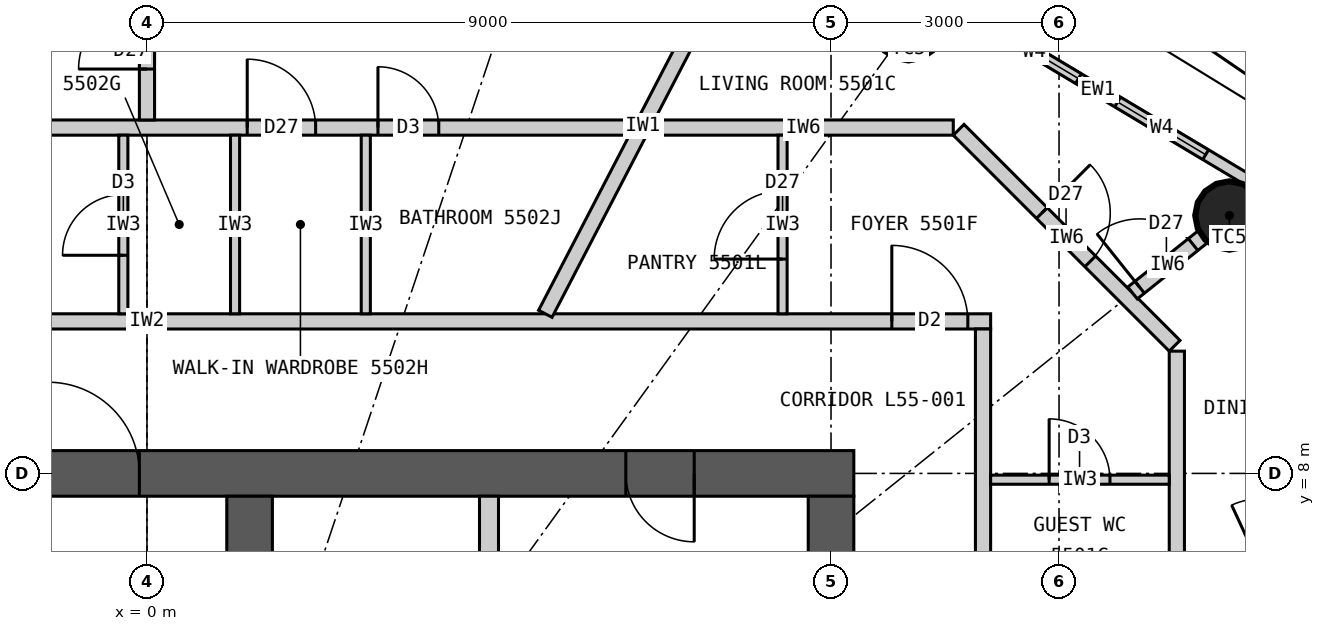
"""IFC4 building model, lengths in metres.
Left out: names, types, materials, properties, quantities, classifications, styles, units other than length and angle.
Written with IfcOpenShell. Run it as: python <this file> out.ifc"""

import sys

from ifc_helpers import new_model, si_unit, direction, frame, frame_2d, origin, origin_2d, place, context, subcontext, project, spatial, rectangle, circle, extrude, element, fill, save


model = new_model("IFC4")
c1 = context("Model", 3, precision=1e-05, world=origin(), true_north=direction((0.0, 1.0)))
c2 = subcontext(c1, "Body", "Model", "MODEL_VIEW")
j1 = project(units=[si_unit("LENGTHUNIT", "METRE"), si_unit("PLANEANGLEUNIT", "RADIAN")], contexts=[c1])
p1 = place(None, origin())
s1 = spatial("IfcSite", under=j1, at=p1, CompositionType="ELEMENT")
p2 = place(p1, origin())
s2 = spatial("IfcBuilding", under=s1, at=p2, CompositionType="ELEMENT")
p3 = place(p2, frame((0.0, 0.0, 206.1)))
s3 = spatial("IfcBuildingStorey", under=s2, at=p3, CompositionType="ELEMENT", Elevation=206.1)
for number, where, z_axis, x_axis in (
    (1, (14.241, 11.393, 0.0), (0.0, 0.0, 1.0), (1.0, 0.0, 0.0)),
    (2, (10.019, 13.883, 0.0), (0.0, 0.0, 1.0), (1.0, 0.0, 0.0)),
):
    element("IfcColumn", number, at=place(p3, frame(where, z_axis=z_axis, x_axis=x_axis)), inside=s3, PredefinedType="COLUMN", context=c2, shape_type="SweptSolid", body=[
        extrude(circle(Radius=0.45, at=origin_2d()), origin(), (0.0, 0.0, 1.0), 3.3),
    ])
p4 = place(p3, frame((-9.3, 8.0, 0.0), z_axis=(0.0, 0.0, 1.0), x_axis=(1.0, 0.0, 0.0)))
e3 = element("IfcWall", 3, at=p4, inside=s3, PredefinedType="SHEAR", context=c2, shape_type="SweptSolid", body=[
    extrude(rectangle(XDim=18.6, YDim=0.6, at=frame_2d((9.3, 0.0))), origin(), (0.0, 0.0, 1.0), 3.3),
])
p5 = place(p4, frame((8.0, 0.0, 0.0)))
e4 = element("IfcOpeningElement", 4, at=p5, cuts=e3, PredefinedType="OPENING", context=c2, shape_type="SweptSolid", body=[
    extrude(rectangle(XDim=1.2, YDim=2.2, at=frame_2d((0.6, 1.1))), frame((0.0, 0.31, 0.0), z_axis=(0.0, -1.0, 0.0), x_axis=(1.0, 0.0, 0.0)), (0.0, 0.0, 1.0), 0.62),
])
p6 = place(p4, frame((15.6, 0.0, 0.0)))
e5 = element("IfcOpeningElement", 5, at=p6, cuts=e3, PredefinedType="OPENING", context=c2, shape_type="SweptSolid", body=[
    extrude(rectangle(XDim=0.9, YDim=2.2, at=frame_2d((0.45, 1.1))), frame((0.0, 0.31, 0.0), z_axis=(0.0, -1.0, 0.0), x_axis=(1.0, 0.0, 0.0)), (0.0, 0.0, 1.0), 0.62),
])
p7 = place(p3, frame((9.0, -7.7, 0.0), z_axis=(0.0, 0.0, 1.0), x_axis=(0.0, 1.0, 0.0)))
e6 = element("IfcWall", 6, at=p7, inside=s3, PredefinedType="SHEAR", context=c2, shape_type="SweptSolid", body=[
    extrude(rectangle(XDim=15.4, YDim=0.6, at=frame_2d((7.7, 0.0))), origin(), (0.0, 0.0, 1.0), 3.3),
])
p8 = place(p7, frame((6.8, 0.0, 0.0)))
e7 = element("IfcOpeningElement", 7, at=p8, cuts=e6, PredefinedType="OPENING", context=c2, shape_type="SweptSolid", body=[
    extrude(rectangle(XDim=1.8, YDim=2.2, at=frame_2d((0.9, 1.1))), frame((0.0, 0.31, 0.0), z_axis=(0.0, -1.0, 0.0), x_axis=(1.0, 0.0, 0.0)), (0.0, 0.0, 1.0), 0.62),
])
p9 = place(p3, frame((1.35, 4.5, 0.0), z_axis=(0.0, 0.0, 1.0), x_axis=(0.0, 1.0, 0.0)))
e8 = element("IfcWall", 8, at=p9, inside=s3, PredefinedType="SHEAR", context=c2, shape_type="SweptSolid", body=[
    extrude(rectangle(XDim=3.2, YDim=0.6, at=frame_2d((1.6, 0.0))), origin(), (0.0, 0.0, 1.0), 3.3),
])
p10 = place(p9, frame((1.05, 0.0, 0.0)))
e9 = element("IfcOpeningElement", 9, at=p10, cuts=e8, PredefinedType="OPENING", context=c2, shape_type="SweptSolid", body=[
    extrude(rectangle(XDim=1.1, YDim=2.2, at=frame_2d((0.55, 1.1))), frame((0.0, 0.31, 0.0), z_axis=(0.0, -1.0, 0.0), x_axis=(1.0, 0.0, 0.0)), (0.0, 0.0, 1.0), 0.62),
])
p11 = place(p3, frame((4.5, 4.5, 0.0), z_axis=(0.0, 0.0, 1.0), x_axis=(0.0, 1.0, 0.0)))
e10 = element("IfcWall", 10, at=p11, inside=s3, PredefinedType="PARTITIONING", context=c2, shape_type="SweptSolid", body=[
    extrude(rectangle(XDim=3.2, YDim=0.25, at=frame_2d((1.6, 0.0))), origin(), (0.0, 0.0, 1.0), 3.3),
])
p12 = place(p3, frame((14.68, 11.744, 0.0), z_axis=(0.0, 0.0, 1.0), x_axis=(-0.85822150553, 0.513279502265, 0.0)))
e11 = element("IfcWall", 11, at=p12, inside=s3, PredefinedType="ELEMENTEDWALL", context=c2, shape_type="SweptSolid", body=[
    extrude(rectangle(XDim=5.05, YDim=0.15, at=frame_2d((2.525, 0.0))), origin(), (0.0, 0.0, 1.0), 3.12),
])
p13 = place(p12, frame((0.875, 0.0, 0.9)))
e12 = element("IfcOpeningElement", 12, at=p13, cuts=e11, PredefinedType="OPENING", context=c2, shape_type="SweptSolid", body=[
    extrude(rectangle(XDim=1.35, YDim=1.9, at=frame_2d((0.675, 0.95))), frame((0.0, 0.085, 0.0), z_axis=(0.0, -1.0, 0.0), x_axis=(1.0, 0.0, 0.0)), (0.0, 0.0, 1.0), 0.17),
])
p14 = place(p12, frame((2.825, 0.0, 0.9)))
e13 = element("IfcOpeningElement", 13, at=p14, cuts=e11, PredefinedType="OPENING", context=c2, shape_type="SweptSolid", body=[
    extrude(rectangle(XDim=1.35, YDim=1.9, at=frame_2d((0.675, 0.95))), frame((0.0, 0.085, 0.0), z_axis=(0.0, -1.0, 0.0), x_axis=(1.0, 0.0, 0.0)), (0.0, 0.0, 1.0), 0.17),
])
p15 = place(p3, frame((-11.1, 10.0, 0.0), z_axis=(0.0, 0.0, 1.0), x_axis=(1.0, 0.0, 0.0)))
e14 = element("IfcWall", 14, at=p15, inside=s3, PredefinedType="PARTITIONING", context=c2, shape_type="SweptSolid", body=[
    extrude(rectangle(XDim=22.2, YDim=0.2, at=frame_2d((11.1, 0.0))), origin(), (0.0, 0.0, 1.0), 3.12),
])
p16 = place(p15, frame((20.9, 0.0, 0.0)))
e15 = element("IfcOpeningElement", 15, at=p16, cuts=e14, PredefinedType="OPENING", context=c2, shape_type="SweptSolid", body=[
    extrude(rectangle(XDim=1.0, YDim=2.2, at=frame_2d((0.5, 1.1))), frame((0.0, 0.11, 0.0), z_axis=(0.0, -1.0, 0.0), x_axis=(1.0, 0.0, 0.0)), (0.0, 0.0, 1.0), 0.22),
])
p17 = place(p15, frame((4.329, 0.0, 0.0)))
e16 = element("IfcOpeningElement", 16, at=p17, cuts=e14, PredefinedType="OPENING", context=c2, shape_type="SweptSolid", body=[
    extrude(rectangle(XDim=1.0, YDim=2.2, at=frame_2d((0.5, 1.1))), frame((0.0, 0.11, 0.0), z_axis=(0.0, -1.0, 0.0), x_axis=(1.0, 0.0, 0.0)), (0.0, 0.0, 1.0), 0.22),
])
p18 = place(p3, frame((11.0, -9.9, 0.0), z_axis=(0.0, 0.0, 1.0), x_axis=(0.0, 1.0, 0.0)))
e17 = element("IfcWall", 17, at=p18, inside=s3, PredefinedType="PARTITIONING", context=c2, shape_type="SweptSolid", body=[
    extrude(rectangle(XDim=19.8, YDim=0.2, at=frame_2d((9.9, 0.0))), origin(), (0.0, 0.0, 1.0), 3.12),
])
p19 = place(p3, frame((5.241, 10.1, 0.0), z_axis=(0.0, 0.0, 1.0), x_axis=(0.460603196597, 0.887606160008, 0.0)))
e18 = element("IfcWall", 18, at=p19, inside=s3, PredefinedType="PARTITIONING", context=c2, shape_type="SweptSolid", body=[
    extrude(rectangle(XDim=5.58, YDim=0.2, at=frame_2d((2.79, 0.0))), origin(), (0.0, 0.0, 1.0), 3.12),
])
p20 = place(p3, frame((13.55, 1.525, 0.0), z_axis=(0.0, 0.0, 1.0), x_axis=(0.0, 1.0, 0.0)))
e19 = element("IfcWall", 19, at=p20, inside=s3, PredefinedType="PARTITIONING", context=c2, shape_type="SweptSolid", body=[
    extrude(rectangle(XDim=8.084, YDim=0.2, at=frame_2d((4.042, 0.0))), origin(), (0.0, 0.0, 1.0), 3.12),
])
p21 = place(p20, frame((1.597, 0.0, 0.0)))
e20 = element("IfcOpeningElement", 20, at=p21, cuts=e19, PredefinedType="OPENING", context=c2, shape_type="SweptSolid", body=[
    extrude(rectangle(XDim=0.8, YDim=2.1, at=frame_2d((0.4, 1.05))), frame((0.0, 0.11, 0.0), z_axis=(0.0, -1.0, 0.0), x_axis=(1.0, 0.0, 0.0)), (0.0, 0.0, 1.0), 0.22),
])
p22 = place(p20, frame((3.57, 0.0, 0.0)))
e21 = element("IfcOpeningElement", 21, at=p22, cuts=e19, PredefinedType="OPENING", context=c2, shape_type="SweptSolid", body=[
    extrude(rectangle(XDim=0.9, YDim=2.1, at=frame_2d((0.45, 1.05))), frame((0.0, 0.11, 0.0), z_axis=(0.0, -1.0, 0.0), x_axis=(1.0, 0.0, 0.0)), (0.0, 0.0, 1.0), 0.22),
])
p23 = place(p3, frame((13.521, 9.679, 0.0), z_axis=(0.0, 0.0, 1.0), x_axis=(-0.707106781187, 0.707106781187, 0.0)))
e22 = element("IfcWall", 22, at=p23, inside=s3, PredefinedType="PARTITIONING", context=c2, shape_type="SweptSolid", body=[
    extrude(rectangle(XDim=4.019, YDim=0.2, at=frame_2d((2.009, 0.0))), origin(), (0.0, 0.0, 1.0), 3.12),
])
p24 = place(p23, frame((1.57, 0.0, 0.0)))
e23 = element("IfcOpeningElement", 23, at=p24, cuts=e22, PredefinedType="OPENING", context=c2, shape_type="SweptSolid", body=[
    extrude(rectangle(XDim=0.9, YDim=2.1, at=frame_2d((0.45, 1.05))), frame((0.0, 0.11, 0.0), z_axis=(0.0, -1.0, 0.0), x_axis=(1.0, 0.0, 0.0)), (0.0, 0.0, 1.0), 0.22),
])
p25 = place(p3, frame((10.609, 12.55, 0.0), z_axis=(0.0, 0.0, 1.0), x_axis=(-1.0, 0.0, 0.0)))
e24 = element("IfcWall", 24, at=p25, inside=s3, PredefinedType="PARTITIONING", context=c2, shape_type="SweptSolid", body=[
    extrude(rectangle(XDim=3.947, YDim=0.2, at=frame_2d((1.974, 0.0))), origin(), (0.0, 0.0, 1.0), 3.12),
])
p26 = place(p3, frame((13.677, 6.317, 0.0), z_axis=(0.0, 0.0, 1.0), x_axis=(0.907825704695, 0.419347695708, 0.0)))
e25 = element("IfcWall", 25, at=p26, inside=s3, PredefinedType="PARTITIONING", context=c2, shape_type="SweptSolid", body=[
    extrude(rectangle(XDim=3.796, YDim=0.2, at=frame_2d((1.898, 0.0))), origin(), (0.0, 0.0, 1.0), 2.32),
])
p27 = place(p26, frame((1.07, 0.0, 0.0)))
e26 = element("IfcOpeningElement", 26, at=p27, cuts=e25, PredefinedType="OPENING", context=c2, shape_type="SweptSolid", body=[
    extrude(rectangle(XDim=0.9, YDim=2.1, at=frame_2d((0.45, 1.05))), frame((0.0, 0.11, 0.0), z_axis=(0.0, -1.0, 0.0), x_axis=(1.0, 0.0, 0.0)), (0.0, 0.0, 1.0), 0.22),
])
p28 = place(p3, frame((12.968, 10.374, 0.0), z_axis=(0.0, 0.0, 1.0), x_axis=(0.780888968944, 0.624669847345, 0.0)))
e27 = element("IfcWall", 27, at=p28, inside=s3, PredefinedType="PARTITIONING", context=c2, shape_type="SweptSolid", body=[
    extrude(rectangle(XDim=1.181, YDim=0.2, at=frame_2d((0.591, 0.0))), origin(), (0.0, 0.0, 1.0), 2.42),
])
p29 = place(p28, frame((0.12, 0.0, 0.0)))
e28 = element("IfcOpeningElement", 28, at=p29, cuts=e27, PredefinedType="OPENING", context=c2, shape_type="SweptSolid", body=[
    extrude(rectangle(XDim=0.9, YDim=2.1, at=frame_2d((0.45, 1.05))), frame((0.0, 0.11, 0.0), z_axis=(0.0, -1.0, 0.0), x_axis=(1.0, 0.0, 0.0)), (0.0, 0.0, 1.0), 0.22),
])
p30 = place(p3, frame((11.1, 7.917, 0.0), z_axis=(0.0, 0.0, 1.0), x_axis=(1.0, 0.0, 0.0)))
e29 = element("IfcWall", 29, at=p30, inside=s3, PredefinedType="PARTITIONING", context=c2, shape_type="SweptSolid", body=[
    extrude(rectangle(XDim=2.35, YDim=0.12, at=frame_2d((1.175, 0.0))), origin(), (0.0, 0.0, 1.0), 3.12),
])
p31 = place(p30, frame((0.77, 0.0, 0.0)))
e30 = element("IfcOpeningElement", 30, at=p31, cuts=e29, PredefinedType="OPENING", context=c2, shape_type="SweptSolid", body=[
    extrude(rectangle(XDim=0.8, YDim=2.1, at=frame_2d((0.4, 1.05))), frame((0.0, 0.07, 0.0), z_axis=(0.0, -1.0, 0.0), x_axis=(1.0, 0.0, 0.0)), (0.0, 0.0, 1.0), 0.14),
])
p32 = place(p3, frame((8.363, 10.1, 0.0), z_axis=(0.0, 0.0, 1.0), x_axis=(0.0, 1.0, 0.0)))
e31 = element("IfcWall", 31, at=p32, inside=s3, PredefinedType="PARTITIONING", context=c2, shape_type="SweptSolid", body=[
    extrude(rectangle(XDim=2.35, YDim=0.12, at=frame_2d((1.175, 0.0))), origin(), (0.0, 0.0, 1.0), 3.12),
])
p33 = place(p32, frame((0.72, 0.0, 0.0)))
e32 = element("IfcOpeningElement", 32, at=p33, cuts=e31, PredefinedType="OPENING", context=c2, shape_type="SweptSolid", body=[
    extrude(rectangle(XDim=0.9, YDim=2.1, at=frame_2d((0.45, 1.05))), frame((0.0, 0.07, 0.0), z_axis=(0.0, -1.0, 0.0), x_axis=(1.0, 0.0, 0.0)), (0.0, 0.0, 1.0), 0.14),
])
p34 = place(p3, frame((6.364, 12.55, 0.0), z_axis=(0.0, 0.0, 1.0), x_axis=(-1.0, 0.0, 0.0)))
e33 = element("IfcWall", 33, at=p34, inside=s3, PredefinedType="PARTITIONING", context=c2, shape_type="SweptSolid", body=[
    extrude(rectangle(XDim=16.972, YDim=0.2, at=frame_2d((8.486, 0.0))), origin(), (0.0, 0.0, 1.0), 3.12),
])
p35 = place(p34, frame((2.525, 0.0, 0.0)))
e34 = element("IfcOpeningElement", 34, at=p35, cuts=e33, PredefinedType="OPENING", context=c2, shape_type="SweptSolid", body=[
    extrude(rectangle(XDim=0.8, YDim=2.1, at=frame_2d((0.4, 1.05))), frame((0.0, 0.11, 0.0), z_axis=(0.0, -1.0, 0.0), x_axis=(1.0, 0.0, 0.0)), (0.0, 0.0, 1.0), 0.22),
])
p36 = place(p34, frame((4.145, 0.0, 0.0)))
e35 = element("IfcOpeningElement", 35, at=p36, cuts=e33, PredefinedType="OPENING", context=c2, shape_type="SweptSolid", body=[
    extrude(rectangle(XDim=0.9, YDim=2.1, at=frame_2d((0.45, 1.05))), frame((0.0, 0.11, 0.0), z_axis=(0.0, -1.0, 0.0), x_axis=(1.0, 0.0, 0.0)), (0.0, 0.0, 1.0), 0.22),
])
p37 = place(p34, frame((13.52, 0.0, 0.0)))
e36 = element("IfcOpeningElement", 36, at=p37, cuts=e33, PredefinedType="OPENING", context=c2, shape_type="SweptSolid", body=[
    extrude(rectangle(XDim=0.9, YDim=2.1, at=frame_2d((0.45, 1.05))), frame((0.0, 0.11, 0.0), z_axis=(0.0, -1.0, 0.0), x_axis=(1.0, 0.0, 0.0)), (0.0, 0.0, 1.0), 0.22),
])
p38 = place(p3, frame((0.0, 12.65, 0.0), z_axis=(0.0, 0.0, 1.0), x_axis=(0.0, 1.0, 0.0)))
e37 = element("IfcWall", 37, at=p38, inside=s3, PredefinedType="PARTITIONING", context=c2, shape_type="SweptSolid", body=[
    extrude(rectangle(XDim=2.85, YDim=0.2, at=frame_2d((1.425, 0.0))), origin(), (0.0, 0.0, 1.0), 2.42),
])
p39 = place(p38, frame((0.67, 0.0, 0.0)))
e38 = element("IfcOpeningElement", 38, at=p39, cuts=e37, PredefinedType="OPENING", context=c2, shape_type="SweptSolid", body=[
    extrude(rectangle(XDim=0.9, YDim=2.1, at=frame_2d((0.45, 1.05))), frame((0.0, 0.11, 0.0), z_axis=(0.0, -1.0, 0.0), x_axis=(1.0, 0.0, 0.0)), (0.0, 0.0, 1.0), 0.22),
])
for number, where, z_axis, x_axis in (
    (39, (2.879, 10.1, 0.0), (0.0, 0.0, 1.0), (0.0, 1.0, 0.0)),
    (40, (1.159, 10.1, 0.0), (0.0, 0.0, 1.0), (0.0, 1.0, 0.0)),
):
    element("IfcWall", number, at=place(p3, frame(where, z_axis=z_axis, x_axis=x_axis)), inside=s3, PredefinedType="PARTITIONING", context=c2, shape_type="SweptSolid", body=[
        extrude(rectangle(XDim=2.35, YDim=0.12, at=frame_2d((1.175, 0.0))), origin(), (0.0, 0.0, 1.0), 3.12),
    ])
p40 = place(p3, frame((-0.311, 10.1, 0.0), z_axis=(0.0, 0.0, 1.0), x_axis=(0.0, 1.0, 0.0)))
e41 = element("IfcWall", 41, at=p40, inside=s3, PredefinedType="PARTITIONING", context=c2, shape_type="SweptSolid", body=[
    extrude(rectangle(XDim=2.35, YDim=0.12, at=frame_2d((1.175, 0.0))), origin(), (0.0, 0.0, 1.0), 3.12),
])
p41 = place(p40, frame((0.77, 0.0, 0.0)))
e42 = element("IfcOpeningElement", 42, at=p41, cuts=e41, PredefinedType="OPENING", context=c2, shape_type="SweptSolid", body=[
    extrude(rectangle(XDim=0.8, YDim=2.1, at=frame_2d((0.4, 1.05))), frame((0.0, 0.07, 0.0), z_axis=(0.0, -1.0, 0.0), x_axis=(1.0, 0.0, 0.0)), (0.0, 0.0, 1.0), 0.14),
])
p42 = place(p13, origin())
e43 = element("IfcWindow", 43, at=p42, inside=s3, PartitioningType="SINGLE_PANEL", PredefinedType="WINDOW", context=c2, shape_type="SweptSolid", body=[
    extrude(rectangle(XDim=1.35, YDim=1.9, at=frame_2d((0.675, 0.95))), frame((0.0, 0.03, 0.0), z_axis=(0.0, -1.0, 0.0), x_axis=(1.0, 0.0, 0.0)), (0.0, 0.0, 1.0), 0.06),
])
fill(e12, e43)
p43 = place(p14, origin())
e44 = element("IfcWindow", 44, at=p43, inside=s3, PartitioningType="SINGLE_PANEL", PredefinedType="WINDOW", context=c2, shape_type="SweptSolid", body=[
    extrude(rectangle(XDim=1.35, YDim=1.9, at=frame_2d((0.675, 0.95))), frame((0.0, 0.03, 0.0), z_axis=(0.0, -1.0, 0.0), x_axis=(1.0, 0.0, 0.0)), (0.0, 0.0, 1.0), 0.06),
])
fill(e13, e44)
p44 = place(p16, origin())
e45 = element("IfcDoor", 45, at=p44, inside=s3, OperationType="SINGLE_SWING_LEFT", PredefinedType="DOOR", context=c2, shape_type="SweptSolid", body=[
    extrude(rectangle(XDim=1.0, YDim=2.2, at=frame_2d((0.5, 1.1))), frame((0.0, 0.025, 0.0), z_axis=(0.0, -1.0, 0.0), x_axis=(1.0, 0.0, 0.0)), (0.0, 0.0, 1.0), 0.05),
])
fill(e15, e45)
p45 = place(p31, origin())
e46 = element("IfcDoor", 46, at=p45, inside=s3, OperationType="SINGLE_SWING_LEFT", PredefinedType="DOOR", context=c2, shape_type="SweptSolid", body=[
    extrude(rectangle(XDim=0.8, YDim=2.1, at=frame_2d((0.4, 1.05))), frame((0.0, 0.025, 0.0), z_axis=(0.0, -1.0, 0.0), x_axis=(1.0, 0.0, 0.0)), (0.0, 0.0, 1.0), 0.05),
])
fill(e30, e46)
p46 = place(p33, origin())
e47 = element("IfcDoor", 47, at=p46, inside=s3, OperationType="SINGLE_SWING_LEFT", PredefinedType="DOOR", context=c2, shape_type="SweptSolid", body=[
    extrude(rectangle(XDim=0.9, YDim=2.1, at=frame_2d((0.45, 1.05))), frame((0.0, 0.025, 0.0), z_axis=(0.0, -1.0, 0.0), x_axis=(1.0, 0.0, 0.0)), (0.0, 0.0, 1.0), 0.05),
])
fill(e32, e47)
p47 = place(p24, origin())
e48 = element("IfcDoor", 48, at=p47, inside=s3, OperationType="SINGLE_SWING_RIGHT", PredefinedType="DOOR", context=c2, shape_type="SweptSolid", body=[
    extrude(rectangle(XDim=0.9, YDim=2.1, at=frame_2d((0.45, 1.05))), frame((0.0, 0.025, 0.0), z_axis=(0.0, -1.0, 0.0), x_axis=(1.0, 0.0, 0.0)), (0.0, 0.0, 1.0), 0.05),
])
fill(e23, e48)
p48 = place(p29, origin())
e49 = element("IfcDoor", 49, at=p48, inside=s3, OperationType="SINGLE_SWING_LEFT", PredefinedType="DOOR", context=c2, shape_type="SweptSolid", body=[
    extrude(rectangle(XDim=0.9, YDim=2.1, at=frame_2d((0.45, 1.05))), frame((0.0, 0.025, 0.0), z_axis=(0.0, -1.0, 0.0), x_axis=(1.0, 0.0, 0.0)), (0.0, 0.0, 1.0), 0.05),
])
fill(e28, e49)
p49 = place(p35, origin())
e50 = element("IfcDoor", 50, at=p49, inside=s3, OperationType="SINGLE_SWING_RIGHT", PredefinedType="DOOR", context=c2, shape_type="SweptSolid", body=[
    extrude(rectangle(XDim=0.8, YDim=2.1, at=frame_2d((0.4, 1.05))), frame((0.0, 0.025, 0.0), z_axis=(0.0, -1.0, 0.0), x_axis=(1.0, 0.0, 0.0)), (0.0, 0.0, 1.0), 0.05),
])
fill(e34, e50)
p50 = place(p36, origin())
e51 = element("IfcDoor", 51, at=p50, inside=s3, OperationType="SINGLE_SWING_RIGHT", PredefinedType="DOOR", context=c2, shape_type="SweptSolid", body=[
    extrude(rectangle(XDim=0.9, YDim=2.1, at=frame_2d((0.45, 1.05))), frame((0.0, 0.025, 0.0), z_axis=(0.0, -1.0, 0.0), x_axis=(1.0, 0.0, 0.0)), (0.0, 0.0, 1.0), 0.05),
])
fill(e35, e51)
p51 = place(p41, origin())
e52 = element("IfcDoor", 52, at=p51, inside=s3, OperationType="SINGLE_SWING_LEFT", PredefinedType="DOOR", context=c2, shape_type="SweptSolid", body=[
    extrude(rectangle(XDim=0.8, YDim=2.1, at=frame_2d((0.4, 1.05))), frame((0.0, 0.025, 0.0), z_axis=(0.0, -1.0, 0.0), x_axis=(1.0, 0.0, 0.0)), (0.0, 0.0, 1.0), 0.05),
])
fill(e42, e52)
p52 = place(p39, origin())
e53 = element("IfcDoor", 53, at=p52, inside=s3, OperationType="SINGLE_SWING_LEFT", PredefinedType="DOOR", context=c2, shape_type="SweptSolid", body=[
    extrude(rectangle(XDim=0.9, YDim=2.1, at=frame_2d((0.45, 1.05))), frame((0.0, 0.025, 0.0), z_axis=(0.0, -1.0, 0.0), x_axis=(1.0, 0.0, 0.0)), (0.0, 0.0, 1.0), 0.05),
])
fill(e38, e53)
p53 = place(p5, origin())
e54 = element("IfcDoor", 54, at=p53, inside=s3, OperationType="SINGLE_SWING_LEFT", PredefinedType="DOOR", context=c2, shape_type="SweptSolid", body=[
    extrude(rectangle(XDim=1.2, YDim=2.2, at=frame_2d((0.6, 1.1))), frame((0.0, 0.025, 0.0), z_axis=(0.0, -1.0, 0.0), x_axis=(1.0, 0.0, 0.0)), (0.0, 0.0, 1.0), 0.05),
])
fill(e4, e54)
p54 = place(p6, origin())
e55 = element("IfcDoor", 55, at=p54, inside=s3, OperationType="SINGLE_SWING_RIGHT", PredefinedType="DOOR", context=c2, shape_type="SweptSolid", body=[
    extrude(rectangle(XDim=0.9, YDim=2.2, at=frame_2d((0.45, 1.1))), frame((0.0, 0.025, 0.0), z_axis=(0.0, -1.0, 0.0), x_axis=(1.0, 0.0, 0.0)), (0.0, 0.0, 1.0), 0.05),
])
fill(e5, e55)
save(model, sys.argv[1])
